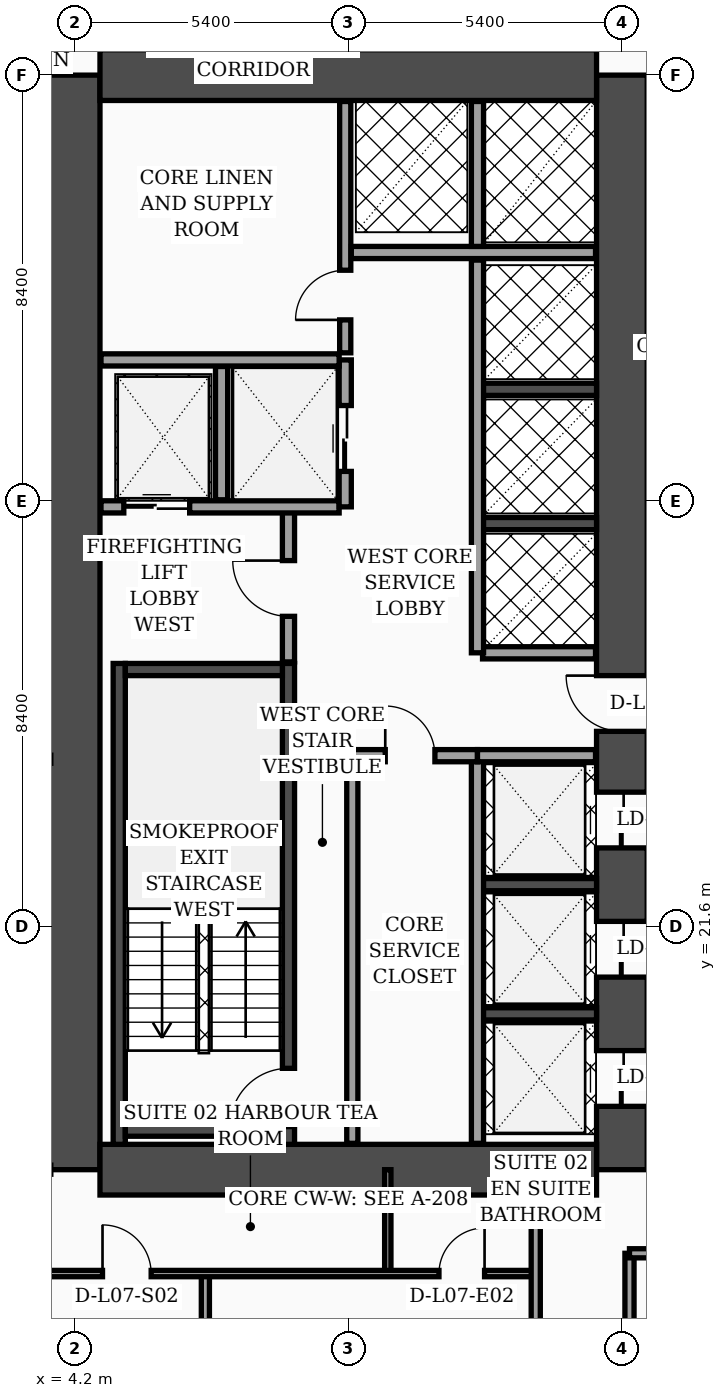
"""IFC4 building model, lengths in metres.
Left out: names, types, materials, properties, quantities, classifications, styles, units other than length and angle.
Written with IfcOpenShell. Run it as: python <this file> out.ifc"""

import sys

from ifc_helpers import new_model, si_unit, direction, frame, frame_2d, origin, place, context, subcontext, project, spatial, rectangle, extrude, element, fill, save


model = new_model("IFC4")
c1 = context("Model", 3, precision=1e-05, world=origin(), true_north=direction((0.0, 1.0)))
c2 = subcontext(c1, "Body", "Model", "MODEL_VIEW")
j1 = project(units=[si_unit("LENGTHUNIT", "METRE"), si_unit("PLANEANGLEUNIT", "RADIAN")], contexts=[c1])
p1 = place(None, origin())
s1 = spatial("IfcSite", under=j1, at=p1, CompositionType="ELEMENT")
p2 = place(p1, origin())
s2 = spatial("IfcBuilding", under=s1, at=p2, CompositionType="ELEMENT")
p3 = place(p2, frame((0.0, 0.0, 34.6)))
s3 = spatial("IfcBuildingStorey", under=s2, at=p3, CompositionType="ELEMENT", Elevation=34.6)
p4 = place(p3, frame((4.2, 16.8, 0.0), z_axis=(0.0, 0.0, 1.0), x_axis=(0.0, 1.0, 0.0)))
e1 = element("IfcWall", 1, at=p4, inside=s3, PredefinedType="SHEAR", context=c2, shape_type="SweptSolid", body=[
    extrude(rectangle(XDim=21.6, YDim=1.0, at=frame_2d((10.8, 0.0))), origin(), (0.0, 0.0, 1.0), 3.56),
])
p5 = place(p3, frame((15.0, 16.8, 0.0), z_axis=(0.0, 0.0, 1.0), x_axis=(0.0, 1.0, 0.0)))
e2 = element("IfcWall", 2, at=p5, inside=s3, PredefinedType="SHEAR", context=c2, shape_type="SweptSolid", body=[
    extrude(rectangle(XDim=21.6, YDim=1.0, at=frame_2d((10.8, 0.0))), origin(), (0.0, 0.0, 1.0), 3.56),
])
p6 = place(p5, frame((8.65, 0.0, 0.0)))
e3 = element("IfcOpeningElement", 3, at=p6, cuts=e2, PredefinedType="OPENING", context=c2, shape_type="SweptSolid", body=[
    extrude(rectangle(XDim=1.1, YDim=2.2, at=frame_2d((0.55, 1.1))), frame((0.0, 0.51, 0.0), z_axis=(0.0, -1.0, 0.0), x_axis=(1.0, 0.0, 0.0)), (0.0, 0.0, 1.0), 1.02),
])
p7 = place(p5, frame((1.25, 0.0, 0.0)))
e4 = element("IfcOpeningElement", 4, at=p7, cuts=e2, PredefinedType="OPENING", context=c2, shape_type="SweptSolid", body=[
    extrude(rectangle(XDim=1.1, YDim=2.2, at=frame_2d((0.55, 1.1))), frame((0.0, 0.51, 0.0), z_axis=(0.0, -1.0, 0.0), x_axis=(1.0, 0.0, 0.0)), (0.0, 0.0, 1.0), 1.02),
])
p8 = place(p5, frame((3.8, 0.0, 0.0)))
e5 = element("IfcOpeningElement", 5, at=p8, cuts=e2, PredefinedType="OPENING", context=c2, shape_type="SweptSolid", body=[
    extrude(rectangle(XDim=1.1, YDim=2.2, at=frame_2d((0.55, 1.1))), frame((0.0, 0.51, 0.0), z_axis=(0.0, -1.0, 0.0), x_axis=(1.0, 0.0, 0.0)), (0.0, 0.0, 1.0), 1.02),
])
p9 = place(p5, frame((6.35, 0.0, 0.0)))
e6 = element("IfcOpeningElement", 6, at=p9, cuts=e2, PredefinedType="OPENING", context=c2, shape_type="SweptSolid", body=[
    extrude(rectangle(XDim=1.1, YDim=2.2, at=frame_2d((0.55, 1.1))), frame((0.0, 0.51, 0.0), z_axis=(0.0, -1.0, 0.0), x_axis=(1.0, 0.0, 0.0)), (0.0, 0.0, 1.0), 1.02),
])
for number, where, z_axis, x_axis in (
    (7, (4.7, 38.4, 0.0), (0.0, 0.0, 1.0), (1.0, 0.0, 0.0)),
    (8, (4.7, 16.8, 0.0), (0.0, 0.0, 1.0), (1.0, 0.0, 0.0)),
):
    element("IfcWall", number, at=place(p3, frame(where, z_axis=z_axis, x_axis=x_axis)), inside=s3, PredefinedType="SHEAR", context=c2, shape_type="SweptSolid", body=[
        extrude(rectangle(XDim=9.8, YDim=1.0, at=frame_2d((4.9, 0.0))), origin(), (0.0, 0.0, 1.0), 3.56),
    ])
p10 = place(p3, frame((5.08, 17.3, 0.0), z_axis=(0.0, 0.0, 1.0), x_axis=(0.0, 1.0, 0.0)))
e9 = element("IfcWall", 9, at=p10, inside=s3, PredefinedType="SOLIDWALL", context=c2, shape_type="SweptSolid", body=[
    extrude(rectangle(XDim=9.49, YDim=0.24, at=frame_2d((4.745, 0.0))), origin(), (0.0, 0.0, 1.0), 3.56),
])
p11 = place(p3, frame((8.42, 17.3, 0.0), z_axis=(0.0, 0.0, 1.0), x_axis=(0.0, 1.0, 0.0)))
e10 = element("IfcWall", 10, at=p11, inside=s3, PredefinedType="SOLIDWALL", context=c2, shape_type="SweptSolid", body=[
    extrude(rectangle(XDim=9.49, YDim=0.24, at=frame_2d((4.745, 0.0))), origin(), (0.0, 0.0, 1.0), 3.56),
])
p12 = place(p11, frame((0.35, 0.0, 0.0)))
e11 = element("IfcOpeningElement", 11, at=p12, cuts=e10, PredefinedType="OPENING", context=c2, shape_type="SweptSolid", body=[
    extrude(rectangle(XDim=1.15, YDim=2.2, at=frame_2d((0.575, 1.1))), frame((0.0, 0.13, 0.0), z_axis=(0.0, -1.0, 0.0), x_axis=(1.0, 0.0, 0.0)), (0.0, 0.0, 1.0), 0.26),
])
for number, where, z_axis, x_axis in (
    (12, (5.2, 17.58, 0.0), (0.0, 0.0, 1.0), (1.0, 0.0, 0.0)),
    (13, (5.2, 26.67, 0.0), (0.0, 0.0, 1.0), (1.0, 0.0, 0.0)),
):
    element("IfcWall", number, at=place(p3, frame(where, z_axis=z_axis, x_axis=x_axis)), inside=s3, PredefinedType="SOLIDWALL", context=c2, shape_type="SweptSolid", body=[
        extrude(rectangle(XDim=3.1, YDim=0.24, at=frame_2d((1.55, 0.0))), origin(), (0.0, 0.0, 1.0), 3.56),
    ])
for number, where, z_axis, x_axis in (
    (14, (12.18, 19.875, 0.0), (0.0, 0.0, 1.0), (1.0, 0.0, 0.0)),
    (15, (12.18, 22.425, 0.0), (0.0, 0.0, 1.0), (1.0, 0.0, 0.0)),
    (16, (12.18, 29.55, 0.0), (0.0, 0.0, 1.0), (1.0, 0.0, 0.0)),
    (17, (12.18, 32.2, 0.0), (0.0, 0.0, 1.0), (1.0, 0.0, 0.0)),
):
    element("IfcWall", number, at=place(p3, frame(where, z_axis=z_axis, x_axis=x_axis)), inside=s3, PredefinedType="SOLIDWALL", context=c2, shape_type="SweptSolid", body=[
        extrude(rectangle(XDim=2.32, YDim=0.24, at=frame_2d((1.16, 0.0))), origin(), (0.0, 0.0, 1.0), 3.56),
    ])
p13 = place(p3, frame((8.42, 26.82, 0.0), z_axis=(0.0, 0.0, 1.0), x_axis=(0.0, 1.0, 0.0)))
e18 = element("IfcWall", 18, at=p13, inside=s3, PredefinedType="SOLIDWALL", context=c2, shape_type="SweptSolid", body=[
    extrude(rectangle(XDim=3.0, YDim=0.24, at=frame_2d((1.5, 0.0))), origin(), (0.0, 0.0, 1.0), 3.56),
])
p14 = place(p13, frame((0.9, 0.0, 0.0)))
e19 = element("IfcOpeningElement", 19, at=p14, cuts=e18, PredefinedType="OPENING", context=c2, shape_type="SweptSolid", body=[
    extrude(rectangle(XDim=1.1, YDim=2.2, at=frame_2d((0.55, 1.1))), frame((0.0, 0.13, 0.0), z_axis=(0.0, -1.0, 0.0), x_axis=(1.0, 0.0, 0.0)), (0.0, 0.0, 1.0), 0.26),
])
p15 = place(p3, frame((4.72, 29.88, 0.0), z_axis=(0.0, 0.0, 1.0), x_axis=(1.0, 0.0, 0.0)))
e20 = element("IfcWall", 20, at=p15, inside=s3, PredefinedType="SOLIDWALL", context=c2, shape_type="SweptSolid", body=[
    extrude(rectangle(XDim=4.7, YDim=0.24, at=frame_2d((2.35, 0.0))), origin(), (0.0, 0.0, 1.0), 3.56),
])
p16 = place(p15, frame((0.45, 0.0, 0.0)))
e21 = element("IfcOpeningElement", 21, at=p16, cuts=e20, PredefinedType="OPENING", context=c2, shape_type="SweptSolid", body=[
    extrude(rectangle(XDim=1.3, YDim=2.35, at=frame_2d((0.65, 1.175))), frame((0.0, 0.13, 0.0), z_axis=(0.0, -1.0, 0.0), x_axis=(1.0, 0.0, 0.0)), (0.0, 0.0, 1.0), 0.26),
])
p17 = place(p3, frame((7.1, 30.02, 0.0), z_axis=(0.0, 0.0, 1.0), x_axis=(0.0, 1.0, 0.0)))
e22 = element("IfcWall", 22, at=p17, inside=s3, PredefinedType="SOLIDWALL", context=c2, shape_type="SweptSolid", body=[
    extrude(rectangle(XDim=2.63, YDim=0.24, at=frame_2d((1.315, 0.0))), origin(), (0.0, 0.0, 1.0), 3.56),
])
p18 = place(p3, frame((9.54, 29.88, 0.0), z_axis=(0.0, 0.0, 1.0), x_axis=(0.0, 1.0, 0.0)))
e23 = element("IfcWall", 23, at=p18, inside=s3, PredefinedType="SOLIDWALL", context=c2, shape_type="SweptSolid", body=[
    extrude(rectangle(XDim=2.9, YDim=0.24, at=frame_2d((1.45, 0.0))), origin(), (0.0, 0.0, 1.0), 3.56),
])
p19 = place(p18, frame((0.7, 0.0, 0.0)))
e24 = element("IfcOpeningElement", 24, at=p19, cuts=e23, PredefinedType="OPENING", context=c2, shape_type="SweptSolid", body=[
    extrude(rectangle(XDim=1.3, YDim=2.35, at=frame_2d((0.65, 1.175))), frame((0.0, 0.13, 0.0), z_axis=(0.0, -1.0, 0.0), x_axis=(1.0, 0.0, 0.0)), (0.0, 0.0, 1.0), 0.26),
])
p20 = place(p3, frame((4.72, 32.78, 0.0), z_axis=(0.0, 0.0, 1.0), x_axis=(1.0, 0.0, 0.0)))
e25 = element("IfcWall", 25, at=p20, inside=s3, PredefinedType="SOLIDWALL", context=c2, shape_type="SweptSolid", body=[
    extrude(rectangle(XDim=4.7, YDim=0.24, at=frame_2d((2.35, 0.0))), origin(), (0.0, 0.0, 1.0), 3.56),
])
p21 = place(p3, frame((9.68, 17.32, 0.0), z_axis=(0.0, 0.0, 1.0), x_axis=(0.0, 1.0, 0.0)))
e26 = element("IfcWall", 26, at=p21, inside=s3, PredefinedType="SOLIDWALL", context=c2, shape_type="SweptSolid", body=[
    extrude(rectangle(XDim=7.68, YDim=0.22, at=frame_2d((3.84, 0.0))), origin(), (0.0, 0.0, 1.0), 3.56),
])
p22 = place(p3, frame((9.54, 32.92, 0.0), z_axis=(0.0, 0.0, 1.0), x_axis=(0.0, 1.0, 0.0)))
e27 = element("IfcWall", 27, at=p22, inside=s3, PredefinedType="SOLIDWALL", context=c2, shape_type="SweptSolid", body=[
    extrude(rectangle(XDim=4.96, YDim=0.22, at=frame_2d((2.48, 0.0))), origin(), (0.0, 0.0, 1.0), 3.56),
])
p23 = place(p22, frame((0.65, 0.0, 0.0)))
e28 = element("IfcOpeningElement", 28, at=p23, cuts=e27, PredefinedType="OPENING", context=c2, shape_type="SweptSolid", body=[
    extrude(rectangle(XDim=0.98, YDim=2.15, at=frame_2d((0.49, 1.075))), frame((0.0, 0.12, 0.0), z_axis=(0.0, -1.0, 0.0), x_axis=(1.0, 0.0, 0.0)), (0.0, 0.0, 1.0), 0.24),
])
p24 = place(p3, frame((12.15, 17.32, 0.0), z_axis=(0.0, 0.0, 1.0), x_axis=(0.0, 1.0, 0.0)))
e29 = element("IfcWall", 29, at=p24, inside=s3, PredefinedType="SOLIDWALL", context=c2, shape_type="SweptSolid", body=[
    extrude(rectangle(XDim=7.65, YDim=0.24, at=frame_2d((3.825, 0.0))), origin(), (0.0, 0.0, 1.0), 3.56),
])
p25 = place(p3, frame((9.68, 24.97, 0.0), z_axis=(0.0, 0.0, 1.0), x_axis=(1.0, 0.0, 0.0)))
e30 = element("IfcWall", 30, at=p25, inside=s3, PredefinedType="SOLIDWALL", context=c2, shape_type="SweptSolid", body=[
    extrude(rectangle(XDim=2.47, YDim=0.24, at=frame_2d((1.235, 0.0))), origin(), (0.0, 0.0, 1.0), 3.56),
])
p26 = place(p25, frame((0.65, 0.0, 0.0)))
e31 = element("IfcOpeningElement", 31, at=p26, cuts=e30, PredefinedType="OPENING", context=c2, shape_type="SweptSolid", body=[
    extrude(rectangle(XDim=0.98, YDim=2.15, at=frame_2d((0.49, 1.075))), frame((0.0, 0.13, 0.0), z_axis=(0.0, -1.0, 0.0), x_axis=(1.0, 0.0, 0.0)), (0.0, 0.0, 1.0), 0.26),
])
p27 = place(p3, frame((12.15, 24.97, 0.0), z_axis=(0.0, 0.0, 1.0), x_axis=(1.0, 0.0, 0.0)))
e32 = element("IfcWall", 32, at=p27, inside=s3, PredefinedType="SOLIDWALL", context=c2, shape_type="SweptSolid", body=[
    extrude(rectangle(XDim=2.33, YDim=0.24, at=frame_2d((1.165, 0.0))), origin(), (0.0, 0.0, 1.0), 2.84),
])
p28 = place(p3, frame((12.25, 27.0, 0.0), z_axis=(0.0, 0.0, 1.0), x_axis=(1.0, 0.0, 0.0)))
e33 = element("IfcWall", 33, at=p28, inside=s3, PredefinedType="SOLIDWALL", context=c2, shape_type="SweptSolid", body=[
    extrude(rectangle(XDim=2.23, YDim=0.24, at=frame_2d((1.115, 0.0))), origin(), (0.0, 0.0, 1.0), 3.56),
])
p29 = place(p3, frame((12.15, 27.0, 0.0), z_axis=(0.0, 0.0, 1.0), x_axis=(0.0, 1.0, 0.0)))
e34 = element("IfcWall", 34, at=p29, inside=s3, PredefinedType="SOLIDWALL", context=c2, shape_type="SweptSolid", body=[
    extrude(rectangle(XDim=7.75, YDim=0.24, at=frame_2d((3.875, 0.0))), origin(), (0.0, 0.0, 1.0), 3.56),
])
p30 = place(p3, frame((9.66, 34.9, 0.0), z_axis=(0.0, 0.0, 1.0), x_axis=(1.0, 0.0, 0.0)))
e35 = element("IfcWall", 35, at=p30, inside=s3, PredefinedType="SOLIDWALL", context=c2, shape_type="SweptSolid", body=[
    extrude(rectangle(XDim=4.82, YDim=0.24, at=frame_2d((2.41, 0.0))), origin(), (0.0, 0.0, 1.0), 3.56),
])
p31 = place(p3, frame((12.15, 35.02, 0.0), z_axis=(0.0, 0.0, 1.0), x_axis=(0.0, 1.0, 0.0)))
e36 = element("IfcWall", 36, at=p31, inside=s3, PredefinedType="SOLIDWALL", context=c2, shape_type="SweptSolid", body=[
    extrude(rectangle(XDim=2.86, YDim=0.24, at=frame_2d((1.43, 0.0))), origin(), (0.0, 0.0, 1.0), 3.56),
])
p32 = place(p3, frame((10.38, 14.75, 0.0), z_axis=(0.0, 0.0, 1.0), x_axis=(0.0, 1.0, 0.0)))
e37 = element("IfcWall", 37, at=p32, inside=s3, PredefinedType="PARTITIONING", context=c2, shape_type="SweptSolid", body=[
    extrude(rectangle(XDim=2.05, YDim=0.125, at=frame_2d((1.025, 0.0))), origin(), (0.0, 0.0, 1.0), 3.56),
])
p33 = place(p3, frame((6.78, 9.5, 0.0), z_axis=(0.0, 0.0, 1.0), x_axis=(0.0, 1.0, 0.0)))
e38 = element("IfcWall", 38, at=p33, inside=s3, PredefinedType="PARTITIONING", context=c2, shape_type="SweptSolid", body=[
    extrude(rectangle(XDim=5.25, YDim=0.16, at=frame_2d((2.625, 0.0))), origin(), (0.0, 0.0, 1.0), 3.14),
])
p34 = place(p33, frame((2.15, 0.0, 0.0)))
e39 = element("IfcOpeningElement", 39, at=p34, cuts=e38, PredefinedType="OPENING", context=c2, shape_type="SweptSolid", body=[
    extrude(rectangle(XDim=0.96, YDim=2.2, at=frame_2d((0.48, 1.1))), frame((0.0, 0.09, 0.0), z_axis=(0.0, -1.0, 0.0), x_axis=(1.0, 0.0, 0.0)), (0.0, 0.0, 1.0), 0.18),
])
p35 = place(p3, frame((0.08, 14.75, 0.0), z_axis=(0.0, 0.0, 1.0), x_axis=(1.0, 0.0, 0.0)))
e40 = element("IfcWall", 40, at=p35, inside=s3, PredefinedType="PARTITIONING", context=c2, shape_type="SweptSolid", body=[
    extrude(rectangle(XDim=13.22, YDim=0.125, at=frame_2d((6.61, 0.0))), origin(), (0.0, 0.0, 1.0), 2.84),
])
p36 = place(p35, frame((4.67, 0.0, 0.0)))
e41 = element("IfcOpeningElement", 41, at=p36, cuts=e40, PredefinedType="OPENING", context=c2, shape_type="SweptSolid", body=[
    extrude(rectangle(XDim=0.96, YDim=2.2, at=frame_2d((0.48, 1.1))), frame((0.0, 0.073, 0.0), z_axis=(0.0, -1.0, 0.0), x_axis=(1.0, 0.0, 0.0)), (0.0, 0.0, 1.0), 0.145),
])
p37 = place(p35, frame((11.31, 0.0, 0.0)))
e42 = element("IfcOpeningElement", 42, at=p37, cuts=e40, PredefinedType="OPENING", context=c2, shape_type="SweptSolid", body=[
    extrude(rectangle(XDim=0.9, YDim=2.15, at=frame_2d((0.45, 1.075))), frame((0.0, 0.073, 0.0), z_axis=(0.0, -1.0, 0.0), x_axis=(1.0, 0.0, 0.0)), (0.0, 0.0, 1.0), 0.145),
])
p38 = place(p3, frame((13.3, 2.44, 0.0), z_axis=(0.0, 0.0, 1.0), x_axis=(0.0, 1.0, 0.0)))
e43 = element("IfcWall", 43, at=p38, inside=s3, PredefinedType="PARTITIONING", context=c2, shape_type="SweptSolid", body=[
    extrude(rectangle(XDim=14.36, YDim=0.18, at=frame_2d((7.18, 0.0))), origin(), (0.0, 0.0, 1.0), 3.04),
])
p39 = place(p38, frame((3.01, 0.0, 0.0)))
e44 = element("IfcOpeningElement", 44, at=p39, cuts=e43, PredefinedType="OPENING", context=c2, shape_type="SweptSolid", body=[
    extrude(rectangle(XDim=1.02, YDim=2.2, at=frame_2d((0.51, 1.1))), frame((0.0, 0.1, 0.0), z_axis=(0.0, -1.0, 0.0), x_axis=(1.0, 0.0, 0.0)), (0.0, 0.0, 1.0), 0.2),
])
p40 = place(p38, frame((9.18, 0.0, 0.0)))
e45 = element("IfcOpeningElement", 45, at=p40, cuts=e43, PredefinedType="OPENING", context=c2, shape_type="SweptSolid", body=[
    extrude(rectangle(XDim=1.02, YDim=2.2, at=frame_2d((0.51, 1.1))), frame((0.0, 0.1, 0.0), z_axis=(0.0, -1.0, 0.0), x_axis=(1.0, 0.0, 0.0)), (0.0, 0.0, 1.0), 0.2),
])
p41 = place(p3, frame((15.15, 2.44, 0.0), z_axis=(0.0, 0.0, 1.0), x_axis=(0.0, 1.0, 0.0)))
e46 = element("IfcWall", 46, at=p41, inside=s3, PredefinedType="PARTITIONING", context=c2, shape_type="SweptSolid", body=[
    extrude(rectangle(XDim=12.71, YDim=0.18, at=frame_2d((6.355, 0.0))), origin(), (0.0, 0.0, 1.0), 3.04),
])
p42 = place(p3, frame((15.15, 15.15, 0.0), z_axis=(0.0, 0.0, 1.0), x_axis=(1.0, 0.0, 0.0)))
e47 = element("IfcWall", 47, at=p42, inside=s3, PredefinedType="PARTITIONING", context=c2, shape_type="SweptSolid", body=[
    extrude(rectangle(XDim=6.45, YDim=0.18, at=frame_2d((3.225, 0.0))), origin(), (0.0, 0.0, 1.0), 2.34),
])
p43 = place(p42, frame((1.74, 0.0, 0.0)))
e48 = element("IfcOpeningElement", 48, at=p43, cuts=e47, PredefinedType="OPENING", context=c2, shape_type="SweptSolid", body=[
    extrude(rectangle(XDim=1.02, YDim=2.2, at=frame_2d((0.51, 1.1))), frame((0.0, 0.1, 0.0), z_axis=(0.0, -1.0, 0.0), x_axis=(1.0, 0.0, 0.0)), (0.0, 0.0, 1.0), 0.2),
])
p44 = place(p14, origin())
e49 = element("IfcDoor", 49, at=p44, inside=s3, OperationType="SINGLE_SWING_RIGHT", PredefinedType="DOOR", context=c2, shape_type="SweptSolid", body=[
    extrude(rectangle(XDim=1.1, YDim=2.2, at=frame_2d((0.55, 1.1))), frame((0.0, 0.025, 0.0), z_axis=(0.0, -1.0, 0.0), x_axis=(1.0, 0.0, 0.0)), (0.0, 0.0, 1.0), 0.05),
])
fill(e19, e49)
p45 = place(p16, origin())
e50 = element("IfcDoor", 50, at=p45, inside=s3, OperationType="DOUBLE_DOOR_SLIDING", PredefinedType="DOOR", context=c2, shape_type="SweptSolid", body=[
    extrude(rectangle(XDim=1.3, YDim=2.35, at=frame_2d((0.65, 1.175))), frame((0.0, 0.025, 0.0), z_axis=(0.0, -1.0, 0.0), x_axis=(1.0, 0.0, 0.0)), (0.0, 0.0, 1.0), 0.05),
])
fill(e21, e50)
p46 = place(p19, origin())
e51 = element("IfcDoor", 51, at=p46, inside=s3, OperationType="DOUBLE_DOOR_SLIDING", PredefinedType="DOOR", context=c2, shape_type="SweptSolid", body=[
    extrude(rectangle(XDim=1.3, YDim=2.35, at=frame_2d((0.65, 1.175))), frame((0.0, 0.025, 0.0), z_axis=(0.0, -1.0, 0.0), x_axis=(1.0, 0.0, 0.0)), (0.0, 0.0, 1.0), 0.05),
])
fill(e24, e51)
p47 = place(p23, origin())
e52 = element("IfcDoor", 52, at=p47, inside=s3, OperationType="SINGLE_SWING_LEFT", PredefinedType="DOOR", context=c2, shape_type="SweptSolid", body=[
    extrude(rectangle(XDim=0.98, YDim=2.15, at=frame_2d((0.49, 1.075))), frame((0.0, 0.025, 0.0), z_axis=(0.0, -1.0, 0.0), x_axis=(1.0, 0.0, 0.0)), (0.0, 0.0, 1.0), 0.05),
])
fill(e28, e52)
p48 = place(p26, origin())
e53 = element("IfcDoor", 53, at=p48, inside=s3, OperationType="SINGLE_SWING_LEFT", PredefinedType="DOOR", context=c2, shape_type="SweptSolid", body=[
    extrude(rectangle(XDim=0.98, YDim=2.15, at=frame_2d((0.49, 1.075))), frame((0.0, 0.025, 0.0), z_axis=(0.0, -1.0, 0.0), x_axis=(1.0, 0.0, 0.0)), (0.0, 0.0, 1.0), 0.05),
])
fill(e31, e53)
p49 = place(p36, origin())
e54 = element("IfcDoor", 54, at=p49, inside=s3, OperationType="SINGLE_SWING_LEFT", PredefinedType="DOOR", context=c2, shape_type="SweptSolid", body=[
    extrude(rectangle(XDim=0.96, YDim=2.2, at=frame_2d((0.48, 1.1))), frame((0.0, 0.025, 0.0), z_axis=(0.0, -1.0, 0.0), x_axis=(1.0, 0.0, 0.0)), (0.0, 0.0, 1.0), 0.05),
])
fill(e41, e54)
p50 = place(p37, origin())
e55 = element("IfcDoor", 55, at=p50, inside=s3, OperationType="SINGLE_SWING_RIGHT", PredefinedType="DOOR", context=c2, shape_type="SweptSolid", body=[
    extrude(rectangle(XDim=0.9, YDim=2.15, at=frame_2d((0.45, 1.075))), frame((0.0, 0.025, 0.0), z_axis=(0.0, -1.0, 0.0), x_axis=(1.0, 0.0, 0.0)), (0.0, 0.0, 1.0), 0.05),
])
fill(e42, e55)
p51 = place(p12, origin())
e56 = element("IfcDoor", 56, at=p51, inside=s3, OperationType="SINGLE_SWING_LEFT", PredefinedType="DOOR", context=c2, shape_type="SweptSolid", body=[
    extrude(rectangle(XDim=1.15, YDim=2.2, at=frame_2d((0.575, 1.1))), frame((0.0, 0.025, 0.0), z_axis=(0.0, -1.0, 0.0), x_axis=(1.0, 0.0, 0.0)), (0.0, 0.0, 1.0), 0.05),
])
fill(e11, e56)
p52 = place(p6, origin())
e57 = element("IfcDoor", 57, at=p52, inside=s3, OperationType="SINGLE_SWING_RIGHT", PredefinedType="DOOR", context=c2, shape_type="SweptSolid", body=[
    extrude(rectangle(XDim=1.1, YDim=2.2, at=frame_2d((0.55, 1.1))), frame((0.0, 0.025, 0.0), z_axis=(0.0, -1.0, 0.0), x_axis=(1.0, 0.0, 0.0)), (0.0, 0.0, 1.0), 0.05),
])
fill(e3, e57)
p53 = place(p7, origin())
e58 = element("IfcDoor", 58, at=p53, inside=s3, OperationType="DOUBLE_DOOR_SLIDING", PredefinedType="DOOR", context=c2, shape_type="SweptSolid", body=[
    extrude(rectangle(XDim=1.1, YDim=2.2, at=frame_2d((0.55, 1.1))), frame((0.0, 0.025, 0.0), z_axis=(0.0, -1.0, 0.0), x_axis=(1.0, 0.0, 0.0)), (0.0, 0.0, 1.0), 0.05),
])
fill(e4, e58)
p54 = place(p8, origin())
e59 = element("IfcDoor", 59, at=p54, inside=s3, OperationType="DOUBLE_DOOR_SLIDING", PredefinedType="DOOR", context=c2, shape_type="SweptSolid", body=[
    extrude(rectangle(XDim=1.1, YDim=2.2, at=frame_2d((0.55, 1.1))), frame((0.0, 0.025, 0.0), z_axis=(0.0, -1.0, 0.0), x_axis=(1.0, 0.0, 0.0)), (0.0, 0.0, 1.0), 0.05),
])
fill(e5, e59)
p55 = place(p9, origin())
e60 = element("IfcDoor", 60, at=p55, inside=s3, OperationType="DOUBLE_DOOR_SLIDING", PredefinedType="DOOR", context=c2, shape_type="SweptSolid", body=[
    extrude(rectangle(XDim=1.1, YDim=2.2, at=frame_2d((0.55, 1.1))), frame((0.0, 0.025, 0.0), z_axis=(0.0, -1.0, 0.0), x_axis=(1.0, 0.0, 0.0)), (0.0, 0.0, 1.0), 0.05),
])
fill(e6, e60)
save(model, sys.argv[1])
